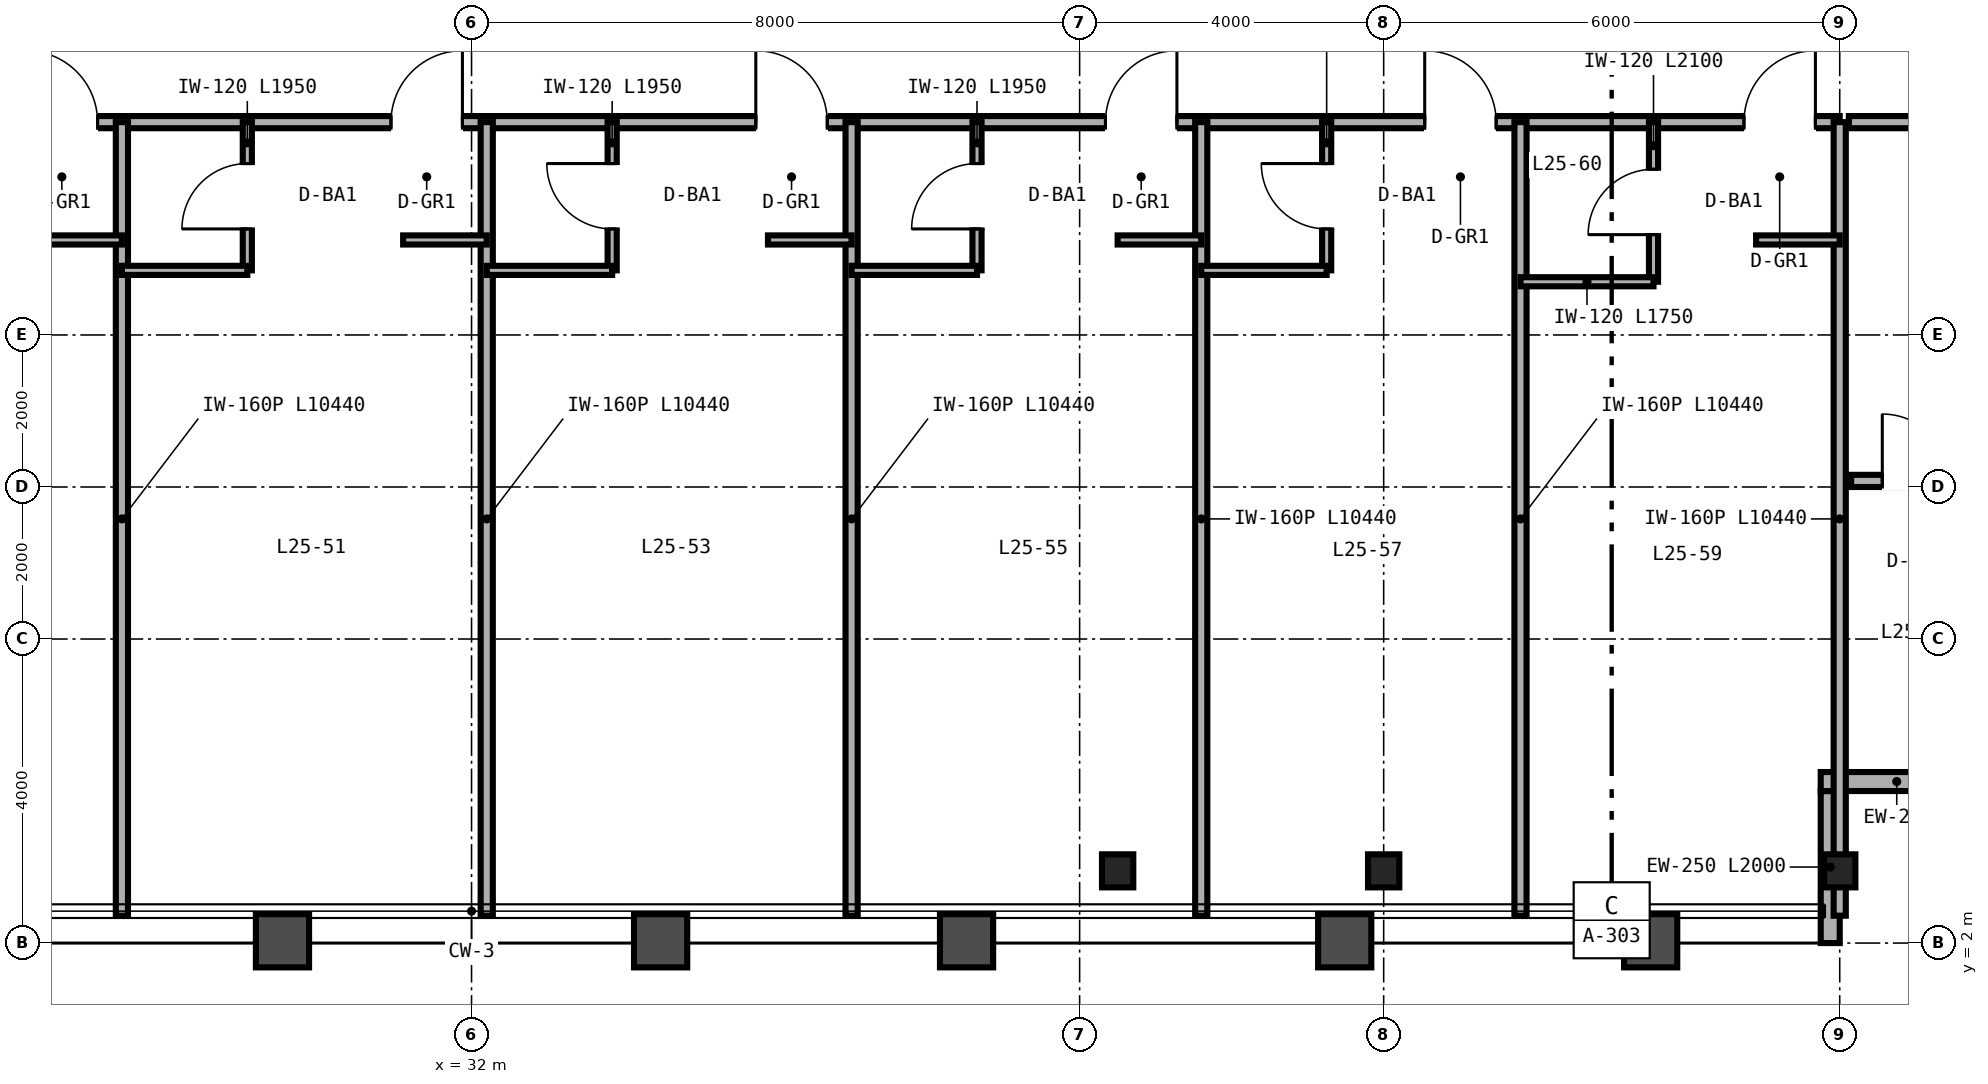
"""IFC4 building model, lengths in metres.
Left out: names, types, materials, properties, quantities, classifications, styles, units other than length and angle.
Written with IfcOpenShell. Run it as: python <this file> out.ifc"""

import sys

from ifc_helpers import new_model, si_unit, direction, frame, frame_2d, origin, origin_2d, place, context, subcontext, project, spatial, rectangle, i_section, extrude, source, transform, mapped, element, fill, save


model = new_model("IFC4")
c1 = context("Model", 3, precision=1e-05, world=origin(), true_north=direction((0.0, 1.0)))
c2 = subcontext(c1, "Body", "Model", "MODEL_VIEW")
j1 = project(units=[si_unit("LENGTHUNIT", "METRE"), si_unit("PLANEANGLEUNIT", "RADIAN")], contexts=[c1])
p1 = place(None, origin())
s1 = spatial("IfcSite", under=j1, at=p1, CompositionType="ELEMENT")
p2 = place(p1, origin())
s2 = spatial("IfcBuilding", under=s1, at=p2, CompositionType="ELEMENT")
p3 = place(p2, frame((0.0, 0.0, 104.4)))
s3 = spatial("IfcBuildingStorey", under=s2, at=p3, CompositionType="ELEMENT", Elevation=104.4)
m1 = source(origin(), c2, "Body", "SweptSolid", [
    extrude(i_section(OverallWidth=0.412, OverallDepth=0.435, WebThickness=0.036, FlangeThickness=0.057, FilletRadius=0.025, at=origin_2d()), origin(), (0.0, 0.0, 1.0), 3.36),
])
for number, where, z_axis, x_axis in (
    (1, (40.5, 2.95, 0.0), (0.0, 0.0, 1.0), (1.0, 0.0, 0.0)),
    (2, (44.0, 2.95, 0.0), (0.0, 0.0, 1.0), (1.0, 0.0, 0.0)),
    (3, (50.0, 2.95, 0.0), (0.0, 0.0, 1.0), (1.0, 0.0, 0.0)),
):
    element("IfcColumn", number, at=place(p3, frame(where, z_axis=z_axis, x_axis=x_axis)), inside=s3, PredefinedType="COLUMN", context=c2, shape_type="MappedRepresentation", body=[
        mapped(m1, transform((0.0, 0.0, 0.0), scale=1.0)),
    ])
p4 = place(p3, frame((49.875, 2.0, 0.0), z_axis=(0.0, 0.0, 1.0), x_axis=(0.0, 1.0, 0.0)))
e4 = element("IfcWall", 4, at=p4, inside=s3, PredefinedType="SOLIDWALL", context=c2, shape_type="SweptSolid", body=[
    extrude(rectangle(XDim=2.0, YDim=0.25, at=frame_2d((1.0, 0.0))), origin(), (0.0, 0.0, 1.0), 2.667),
])
p5 = place(p3, frame((49.75, 4.125, 0.0), z_axis=(0.0, 0.0, 1.0), x_axis=(1.0, 0.0, 0.0)))
e5 = element("IfcWall", 5, at=p5, inside=s3, PredefinedType="SOLIDWALL", context=c2, shape_type="SweptSolid", body=[
    extrude(rectangle(XDim=2.0, YDim=0.25, at=frame_2d((1.0, 0.0))), origin(), (0.0, 0.0, 1.0), 3.36),
])
p6 = place(p3, frame((50.12, 12.8, 0.0), z_axis=(0.0, 0.0, 1.0), x_axis=(1.0, 0.0, 0.0)))
e6 = element("IfcWall", 6, at=p6, inside=s3, PredefinedType="PARTITIONING", context=c2, shape_type="SweptSolid", body=[
    extrude(rectangle(XDim=5.68, YDim=0.16, at=frame_2d((2.84, 0.0))), origin(), (0.0, 0.0, 1.0), 3.36),
])
p7 = place(p6, frame((2.36, 0.0, 0.0)))
e7 = element("IfcOpeningElement", 7, at=p7, cuts=e6, PredefinedType="OPENING", context=c2, shape_type="SweptSolid", body=[
    extrude(rectangle(XDim=0.96, YDim=2.15, at=frame_2d((0.48, 1.075))), frame((0.0, 0.09, 0.0), z_axis=(0.0, -1.0, 0.0), x_axis=(1.0, 0.0, 0.0)), (0.0, 0.0, 1.0), 0.18),
])
p8 = place(p3, frame((50.15, 8.08, 0.0), z_axis=(0.0, 0.0, 1.0), x_axis=(1.0, 0.0, 0.0)))
e8 = element("IfcWall", 8, at=p8, inside=s3, PredefinedType="PARTITIONING", context=c2, shape_type="SweptSolid", body=[
    extrude(rectangle(XDim=1.7, YDim=0.16, at=frame_2d((0.85, 0.0))), origin(), (0.0, 0.0, 1.0), 3.36),
])
p9 = place(p8, frame((0.41, 0.0, 0.0)))
e9 = element("IfcOpeningElement", 9, at=p9, cuts=e8, PredefinedType="OPENING", context=c2, shape_type="SweptSolid", body=[
    extrude(rectangle(XDim=0.88, YDim=2.15, at=frame_2d((0.44, 1.075))), frame((0.0, 0.09, 0.0), z_axis=(0.0, -1.0, 0.0), x_axis=(1.0, 0.0, 0.0)), (0.0, 0.0, 1.0), 0.18),
])
p10 = place(p3, frame((14.0, 12.8, 0.0), z_axis=(0.0, 0.0, 1.0), x_axis=(1.0, 0.0, 0.0)))
e10 = element("IfcWall", 10, at=p10, inside=s3, PredefinedType="PARTITIONING", context=c2, shape_type="SweptSolid", body=[
    extrude(rectangle(XDim=36.0, YDim=0.16, at=frame_2d((18.0, 0.0))), origin(), (0.0, 0.0, 1.0), 2.581),
])
p11 = place(p10, frame((3.14, 0.0, 0.0)))
e11 = element("IfcOpeningElement", 11, at=p11, cuts=e10, PredefinedType="OPENING", context=c2, shape_type="SweptSolid", body=[
    extrude(rectangle(XDim=0.94, YDim=2.15, at=frame_2d((0.47, 1.075))), frame((0.0, 0.09, 0.0), z_axis=(0.0, -1.0, 0.0), x_axis=(1.0, 0.0, 0.0)), (0.0, 0.0, 1.0), 0.18),
])
p12 = place(p10, frame((7.54, 0.0, 0.0)))
e12 = element("IfcOpeningElement", 12, at=p12, cuts=e10, PredefinedType="OPENING", context=c2, shape_type="SweptSolid", body=[
    extrude(rectangle(XDim=0.94, YDim=2.15, at=frame_2d((0.47, 1.075))), frame((0.0, 0.09, 0.0), z_axis=(0.0, -1.0, 0.0), x_axis=(1.0, 0.0, 0.0)), (0.0, 0.0, 1.0), 0.18),
])
p13 = place(p10, frame((12.14, 0.0, 0.0)))
e13 = element("IfcOpeningElement", 13, at=p13, cuts=e10, PredefinedType="OPENING", context=c2, shape_type="SweptSolid", body=[
    extrude(rectangle(XDim=0.94, YDim=2.15, at=frame_2d((0.47, 1.075))), frame((0.0, 0.09, 0.0), z_axis=(0.0, -1.0, 0.0), x_axis=(1.0, 0.0, 0.0)), (0.0, 0.0, 1.0), 0.18),
])
p14 = place(p10, frame((16.94, 0.0, 0.0)))
e14 = element("IfcOpeningElement", 14, at=p14, cuts=e10, PredefinedType="OPENING", context=c2, shape_type="SweptSolid", body=[
    extrude(rectangle(XDim=0.94, YDim=2.15, at=frame_2d((0.47, 1.075))), frame((0.0, 0.09, 0.0), z_axis=(0.0, -1.0, 0.0), x_axis=(1.0, 0.0, 0.0)), (0.0, 0.0, 1.0), 0.18),
])
p15 = place(p10, frame((21.74, 0.0, 0.0)))
e15 = element("IfcOpeningElement", 15, at=p15, cuts=e10, PredefinedType="OPENING", context=c2, shape_type="SweptSolid", body=[
    extrude(rectangle(XDim=0.94, YDim=2.15, at=frame_2d((0.47, 1.075))), frame((0.0, 0.09, 0.0), z_axis=(0.0, -1.0, 0.0), x_axis=(1.0, 0.0, 0.0)), (0.0, 0.0, 1.0), 0.18),
])
p16 = place(p10, frame((26.34, 0.0, 0.0)))
e16 = element("IfcOpeningElement", 16, at=p16, cuts=e10, PredefinedType="OPENING", context=c2, shape_type="SweptSolid", body=[
    extrude(rectangle(XDim=0.94, YDim=2.15, at=frame_2d((0.47, 1.075))), frame((0.0, 0.09, 0.0), z_axis=(0.0, -1.0, 0.0), x_axis=(1.0, 0.0, 0.0)), (0.0, 0.0, 1.0), 0.18),
])
p17 = place(p10, frame((30.54, 0.0, 0.0)))
e17 = element("IfcOpeningElement", 17, at=p17, cuts=e10, PredefinedType="OPENING", context=c2, shape_type="SweptSolid", body=[
    extrude(rectangle(XDim=0.94, YDim=2.15, at=frame_2d((0.47, 1.075))), frame((0.0, 0.09, 0.0), z_axis=(0.0, -1.0, 0.0), x_axis=(1.0, 0.0, 0.0)), (0.0, 0.0, 1.0), 0.18),
])
p18 = place(p10, frame((34.74, 0.0, 0.0)))
e18 = element("IfcOpeningElement", 18, at=p18, cuts=e10, PredefinedType="OPENING", context=c2, shape_type="SweptSolid", body=[
    extrude(rectangle(XDim=0.94, YDim=2.15, at=frame_2d((0.47, 1.075))), frame((0.0, 0.09, 0.0), z_axis=(0.0, -1.0, 0.0), x_axis=(1.0, 0.0, 0.0)), (0.0, 0.0, 1.0), 0.18),
])
p19 = place(p3, frame((50.0, 2.36, 0.0), z_axis=(0.0, 0.0, 1.0), x_axis=(0.0, 1.0, 0.0)))
e19 = element("IfcWall", 19, at=p19, inside=s3, PredefinedType="PARTITIONING", context=c2, shape_type="SweptSolid", body=[
    extrude(rectangle(XDim=10.44, YDim=0.16, at=frame_2d((5.22, 0.0))), origin(), (0.0, 0.0, 1.0), 2.667),
])
p20 = place(p3, frame((27.4, 2.36, 0.0), z_axis=(0.0, 0.0, 1.0), x_axis=(0.0, 1.0, 0.0)))
e20 = element("IfcWall", 20, at=p20, inside=s3, PredefinedType="PARTITIONING", context=c2, shape_type="SweptSolid", body=[
    extrude(rectangle(XDim=10.44, YDim=0.16, at=frame_2d((5.22, 0.0))), origin(), (0.0, 0.0, 1.0), 2.433),
])
p21 = place(p3, frame((26.3, 11.25, 0.0), z_axis=(0.0, 0.0, 1.0), x_axis=(1.0, 0.0, 0.0)))
e21 = element("IfcWall", 21, at=p21, inside=s3, PredefinedType="PARTITIONING", context=c2, shape_type="SweptSolid", body=[
    extrude(rectangle(XDim=1.1, YDim=0.12, at=frame_2d((0.55, 0.0))), origin(), (0.0, 0.0, 1.0), 3.36),
])
p22 = place(p3, frame((32.2, 2.36, 0.0), z_axis=(0.0, 0.0, 1.0), x_axis=(0.0, 1.0, 0.0)))
e22 = element("IfcWall", 22, at=p22, inside=s3, PredefinedType="PARTITIONING", context=c2, shape_type="SweptSolid", body=[
    extrude(rectangle(XDim=10.44, YDim=0.16, at=frame_2d((5.22, 0.0))), origin(), (0.0, 0.0, 1.0), 2.433),
])
p23 = place(p3, frame((29.05, 10.85, 0.0), z_axis=(0.0, 0.0, 1.0), x_axis=(0.0, 1.0, 0.0)))
e23 = element("IfcWall", 23, at=p23, inside=s3, PredefinedType="PARTITIONING", context=c2, shape_type="SweptSolid", body=[
    extrude(rectangle(XDim=1.95, YDim=0.12, at=frame_2d((0.975, 0.0))), origin(), (0.0, 0.0, 1.0), 3.36),
])
p24 = place(p23, frame((0.545, 0.0, 0.0)))
e24 = element("IfcOpeningElement", 24, at=p24, cuts=e23, PredefinedType="OPENING", context=c2, shape_type="SweptSolid", body=[
    extrude(rectangle(XDim=0.86, YDim=2.1, at=frame_2d((0.43, 1.05))), frame((0.0, 0.07, 0.0), z_axis=(0.0, -1.0, 0.0), x_axis=(1.0, 0.0, 0.0)), (0.0, 0.0, 1.0), 0.14),
])
p25 = place(p3, frame((27.4, 10.85, 0.0), z_axis=(0.0, 0.0, 1.0), x_axis=(1.0, 0.0, 0.0)))
e25 = element("IfcWall", 25, at=p25, inside=s3, PredefinedType="PARTITIONING", context=c2, shape_type="SweptSolid", body=[
    extrude(rectangle(XDim=1.65, YDim=0.12, at=frame_2d((0.825, 0.0))), origin(), (0.0, 0.0, 1.0), 3.36),
])
p26 = place(p3, frame((31.1, 11.25, 0.0), z_axis=(0.0, 0.0, 1.0), x_axis=(1.0, 0.0, 0.0)))
e26 = element("IfcWall", 26, at=p26, inside=s3, PredefinedType="PARTITIONING", context=c2, shape_type="SweptSolid", body=[
    extrude(rectangle(XDim=1.1, YDim=0.12, at=frame_2d((0.55, 0.0))), origin(), (0.0, 0.0, 1.0), 3.36),
])
p27 = place(p3, frame((37.0, 2.36, 0.0), z_axis=(0.0, 0.0, 1.0), x_axis=(0.0, 1.0, 0.0)))
e27 = element("IfcWall", 27, at=p27, inside=s3, PredefinedType="PARTITIONING", context=c2, shape_type="SweptSolid", body=[
    extrude(rectangle(XDim=10.44, YDim=0.16, at=frame_2d((5.22, 0.0))), origin(), (0.0, 0.0, 1.0), 2.433),
])
p28 = place(p3, frame((33.85, 10.85, 0.0), z_axis=(0.0, 0.0, 1.0), x_axis=(0.0, 1.0, 0.0)))
e28 = element("IfcWall", 28, at=p28, inside=s3, PredefinedType="PARTITIONING", context=c2, shape_type="SweptSolid", body=[
    extrude(rectangle(XDim=1.95, YDim=0.12, at=frame_2d((0.975, 0.0))), origin(), (0.0, 0.0, 1.0), 3.36),
])
p29 = place(p28, frame((0.545, 0.0, 0.0)))
e29 = element("IfcOpeningElement", 29, at=p29, cuts=e28, PredefinedType="OPENING", context=c2, shape_type="SweptSolid", body=[
    extrude(rectangle(XDim=0.86, YDim=2.1, at=frame_2d((0.43, 1.05))), frame((0.0, 0.07, 0.0), z_axis=(0.0, -1.0, 0.0), x_axis=(1.0, 0.0, 0.0)), (0.0, 0.0, 1.0), 0.14),
])
p30 = place(p3, frame((32.2, 10.85, 0.0), z_axis=(0.0, 0.0, 1.0), x_axis=(1.0, 0.0, 0.0)))
e30 = element("IfcWall", 30, at=p30, inside=s3, PredefinedType="PARTITIONING", context=c2, shape_type="SweptSolid", body=[
    extrude(rectangle(XDim=1.65, YDim=0.12, at=frame_2d((0.825, 0.0))), origin(), (0.0, 0.0, 1.0), 3.36),
])
p31 = place(p3, frame((35.9, 11.25, 0.0), z_axis=(0.0, 0.0, 1.0), x_axis=(1.0, 0.0, 0.0)))
e31 = element("IfcWall", 31, at=p31, inside=s3, PredefinedType="PARTITIONING", context=c2, shape_type="SweptSolid", body=[
    extrude(rectangle(XDim=1.1, YDim=0.12, at=frame_2d((0.55, 0.0))), origin(), (0.0, 0.0, 1.0), 3.36),
])
p32 = place(p3, frame((41.6, 2.36, 0.0), z_axis=(0.0, 0.0, 1.0), x_axis=(0.0, 1.0, 0.0)))
e32 = element("IfcWall", 32, at=p32, inside=s3, PredefinedType="PARTITIONING", context=c2, shape_type="SweptSolid", body=[
    extrude(rectangle(XDim=10.44, YDim=0.16, at=frame_2d((5.22, 0.0))), origin(), (0.0, 0.0, 1.0), 2.823),
])
p33 = place(p3, frame((38.65, 10.85, 0.0), z_axis=(0.0, 0.0, 1.0), x_axis=(0.0, 1.0, 0.0)))
e33 = element("IfcWall", 33, at=p33, inside=s3, PredefinedType="PARTITIONING", context=c2, shape_type="SweptSolid", body=[
    extrude(rectangle(XDim=1.95, YDim=0.12, at=frame_2d((0.975, 0.0))), origin(), (0.0, 0.0, 1.0), 3.36),
])
p34 = place(p33, frame((0.545, 0.0, 0.0)))
e34 = element("IfcOpeningElement", 34, at=p34, cuts=e33, PredefinedType="OPENING", context=c2, shape_type="SweptSolid", body=[
    extrude(rectangle(XDim=0.86, YDim=2.1, at=frame_2d((0.43, 1.05))), frame((0.0, 0.07, 0.0), z_axis=(0.0, -1.0, 0.0), x_axis=(1.0, 0.0, 0.0)), (0.0, 0.0, 1.0), 0.14),
])
p35 = place(p3, frame((37.0, 10.85, 0.0), z_axis=(0.0, 0.0, 1.0), x_axis=(1.0, 0.0, 0.0)))
e35 = element("IfcWall", 35, at=p35, inside=s3, PredefinedType="PARTITIONING", context=c2, shape_type="SweptSolid", body=[
    extrude(rectangle(XDim=1.65, YDim=0.12, at=frame_2d((0.825, 0.0))), origin(), (0.0, 0.0, 1.0), 3.36),
])
p36 = place(p3, frame((40.5, 11.25, 0.0), z_axis=(0.0, 0.0, 1.0), x_axis=(1.0, 0.0, 0.0)))
e36 = element("IfcWall", 36, at=p36, inside=s3, PredefinedType="PARTITIONING", context=c2, shape_type="SweptSolid", body=[
    extrude(rectangle(XDim=1.1, YDim=0.12, at=frame_2d((0.55, 0.0))), origin(), (0.0, 0.0, 1.0), 2.581),
])
p37 = place(p3, frame((45.8, 2.36, 0.0), z_axis=(0.0, 0.0, 1.0), x_axis=(0.0, 1.0, 0.0)))
e37 = element("IfcWall", 37, at=p37, inside=s3, PredefinedType="PARTITIONING", context=c2, shape_type="SweptSolid", body=[
    extrude(rectangle(XDim=10.44, YDim=0.16, at=frame_2d((5.22, 0.0))), origin(), (0.0, 0.0, 1.0), 2.667),
])
p38 = place(p3, frame((43.25, 10.85, 0.0), z_axis=(0.0, 0.0, 1.0), x_axis=(0.0, 1.0, 0.0)))
e38 = element("IfcWall", 38, at=p38, inside=s3, PredefinedType="PARTITIONING", context=c2, shape_type="SweptSolid", body=[
    extrude(rectangle(XDim=1.95, YDim=0.12, at=frame_2d((0.975, 0.0))), origin(), (0.0, 0.0, 1.0), 3.36),
])
p39 = place(p38, frame((0.545, 0.0, 0.0)))
e39 = element("IfcOpeningElement", 39, at=p39, cuts=e38, PredefinedType="OPENING", context=c2, shape_type="SweptSolid", body=[
    extrude(rectangle(XDim=0.86, YDim=2.1, at=frame_2d((0.43, 1.05))), frame((0.0, 0.07, 0.0), z_axis=(0.0, -1.0, 0.0), x_axis=(1.0, 0.0, 0.0)), (0.0, 0.0, 1.0), 0.14),
])
p40 = place(p3, frame((41.6, 10.85, 0.0), z_axis=(0.0, 0.0, 1.0), x_axis=(1.0, 0.0, 0.0)))
e40 = element("IfcWall", 40, at=p40, inside=s3, PredefinedType="PARTITIONING", context=c2, shape_type="SweptSolid", body=[
    extrude(rectangle(XDim=1.65, YDim=0.12, at=frame_2d((0.825, 0.0))), origin(), (0.0, 0.0, 1.0), 3.36),
])
p41 = place(p3, frame((47.55, 10.7, 0.0), z_axis=(0.0, 0.0, 1.0), x_axis=(0.0, 1.0, 0.0)))
e41 = element("IfcWall", 41, at=p41, inside=s3, PredefinedType="PARTITIONING", context=c2, shape_type="SweptSolid", body=[
    extrude(rectangle(XDim=2.1, YDim=0.12, at=frame_2d((1.05, 0.0))), origin(), (0.0, 0.0, 1.0), 3.36),
])
p42 = place(p41, frame((0.62, 0.0, 0.0)))
e42 = element("IfcOpeningElement", 42, at=p42, cuts=e41, PredefinedType="OPENING", context=c2, shape_type="SweptSolid", body=[
    extrude(rectangle(XDim=0.86, YDim=2.1, at=frame_2d((0.43, 1.05))), frame((0.0, 0.07, 0.0), z_axis=(0.0, -1.0, 0.0), x_axis=(1.0, 0.0, 0.0)), (0.0, 0.0, 1.0), 0.14),
])
p43 = place(p3, frame((45.8, 10.7, 0.0), z_axis=(0.0, 0.0, 1.0), x_axis=(1.0, 0.0, 0.0)))
e43 = element("IfcWall", 43, at=p43, inside=s3, PredefinedType="PARTITIONING", context=c2, shape_type="SweptSolid", body=[
    extrude(rectangle(XDim=1.75, YDim=0.12, at=frame_2d((0.875, 0.0))), origin(), (0.0, 0.0, 1.0), 3.36),
])
p44 = place(p3, frame((48.9, 11.25, 0.0), z_axis=(0.0, 0.0, 1.0), x_axis=(1.0, 0.0, 0.0)))
e44 = element("IfcWall", 44, at=p44, inside=s3, PredefinedType="PARTITIONING", context=c2, shape_type="SweptSolid", body=[
    extrude(rectangle(XDim=1.1, YDim=0.12, at=frame_2d((0.55, 0.0))), origin(), (0.0, 0.0, 1.0), 3.36),
])
m2 = source(origin(), c2, "Body", "SweptSolid", [
    extrude(rectangle(XDim=0.88, YDim=2.15, at=frame_2d((0.44, 1.075))), frame((0.0, 0.025, 0.0), z_axis=(0.0, -1.0, 0.0), x_axis=(1.0, 0.0, 0.0)), (0.0, 0.0, 1.0), 0.05),
])
p45 = place(p9, origin())
e45 = element("IfcDoor", 45, at=p45, inside=s3, OperationType="SINGLE_SWING_LEFT", PredefinedType="DOOR", context=c2, shape_type="MappedRepresentation", body=[
    mapped(m2, transform((0.0, 0.0, 0.0), scale=1.0)),
])
fill(e9, e45)
m3 = source(origin(), c2, "Body", "SweptSolid", [
    extrude(rectangle(XDim=0.86, YDim=2.1, at=frame_2d((0.43, 1.05))), frame((0.0, 0.025, 0.0), z_axis=(0.0, -1.0, 0.0), x_axis=(1.0, 0.0, 0.0)), (0.0, 0.0, 1.0), 0.05),
])
p46 = place(p24, origin())
e46 = element("IfcDoor", 46, at=p46, inside=s3, OperationType="SINGLE_SWING_LEFT", PredefinedType="DOOR", context=c2, shape_type="MappedRepresentation", body=[
    mapped(m3, transform((0.0, 0.0, 0.0), scale=1.0)),
])
fill(e24, e46)
p47 = place(p29, origin())
e47 = element("IfcDoor", 47, at=p47, inside=s3, OperationType="SINGLE_SWING_RIGHT", PredefinedType="DOOR", context=c2, shape_type="MappedRepresentation", body=[
    mapped(m3, transform((0.0, 0.0, 0.0), scale=1.0)),
])
fill(e29, e47)
p48 = place(p34, origin())
e48 = element("IfcDoor", 48, at=p48, inside=s3, OperationType="SINGLE_SWING_LEFT", PredefinedType="DOOR", context=c2, shape_type="MappedRepresentation", body=[
    mapped(m3, transform((0.0, 0.0, 0.0), scale=1.0)),
])
fill(e34, e48)
p49 = place(p39, origin())
e49 = element("IfcDoor", 49, at=p49, inside=s3, OperationType="SINGLE_SWING_RIGHT", PredefinedType="DOOR", context=c2, shape_type="MappedRepresentation", body=[
    mapped(m3, transform((0.0, 0.0, 0.0), scale=1.0)),
])
fill(e39, e49)
p50 = place(p42, origin())
e50 = element("IfcDoor", 50, at=p50, inside=s3, OperationType="SINGLE_SWING_LEFT", PredefinedType="DOOR", context=c2, shape_type="MappedRepresentation", body=[
    mapped(m3, transform((0.0, 0.0, 0.0), scale=1.0)),
])
fill(e42, e50)
m4 = source(origin(), c2, "Body", "SweptSolid", [
    extrude(rectangle(XDim=0.94, YDim=2.15, at=frame_2d((0.47, 1.075))), frame((0.0, 0.025, 0.0), z_axis=(0.0, -1.0, 0.0), x_axis=(1.0, 0.0, 0.0)), (0.0, 0.0, 1.0), 0.05),
])
p51 = place(p13, origin())
e51 = element("IfcDoor", 51, at=p51, inside=s3, OperationType="SINGLE_SWING_LEFT", PredefinedType="DOOR", context=c2, shape_type="MappedRepresentation", body=[
    mapped(m4, transform((0.0, 0.0, 0.0), scale=1.0)),
])
fill(e13, e51)
p52 = place(p14, origin())
e52 = element("IfcDoor", 52, at=p52, inside=s3, OperationType="SINGLE_SWING_RIGHT", PredefinedType="DOOR", context=c2, shape_type="MappedRepresentation", body=[
    mapped(m4, transform((0.0, 0.0, 0.0), scale=1.0)),
])
fill(e14, e52)
p53 = place(p15, origin())
e53 = element("IfcDoor", 53, at=p53, inside=s3, OperationType="SINGLE_SWING_LEFT", PredefinedType="DOOR", context=c2, shape_type="MappedRepresentation", body=[
    mapped(m4, transform((0.0, 0.0, 0.0), scale=1.0)),
])
fill(e15, e53)
p54 = place(p16, origin())
e54 = element("IfcDoor", 54, at=p54, inside=s3, OperationType="SINGLE_SWING_RIGHT", PredefinedType="DOOR", context=c2, shape_type="MappedRepresentation", body=[
    mapped(m4, transform((0.0, 0.0, 0.0), scale=1.0)),
])
fill(e16, e54)
p55 = place(p17, origin())
e55 = element("IfcDoor", 55, at=p55, inside=s3, OperationType="SINGLE_SWING_LEFT", PredefinedType="DOOR", context=c2, shape_type="MappedRepresentation", body=[
    mapped(m4, transform((0.0, 0.0, 0.0), scale=1.0)),
])
fill(e17, e55)
p56 = place(p18, origin())
e56 = element("IfcDoor", 56, at=p56, inside=s3, OperationType="SINGLE_SWING_RIGHT", PredefinedType="DOOR", context=c2, shape_type="MappedRepresentation", body=[
    mapped(m4, transform((0.0, 0.0, 0.0), scale=1.0)),
])
fill(e18, e56)
save(model, sys.argv[1])
